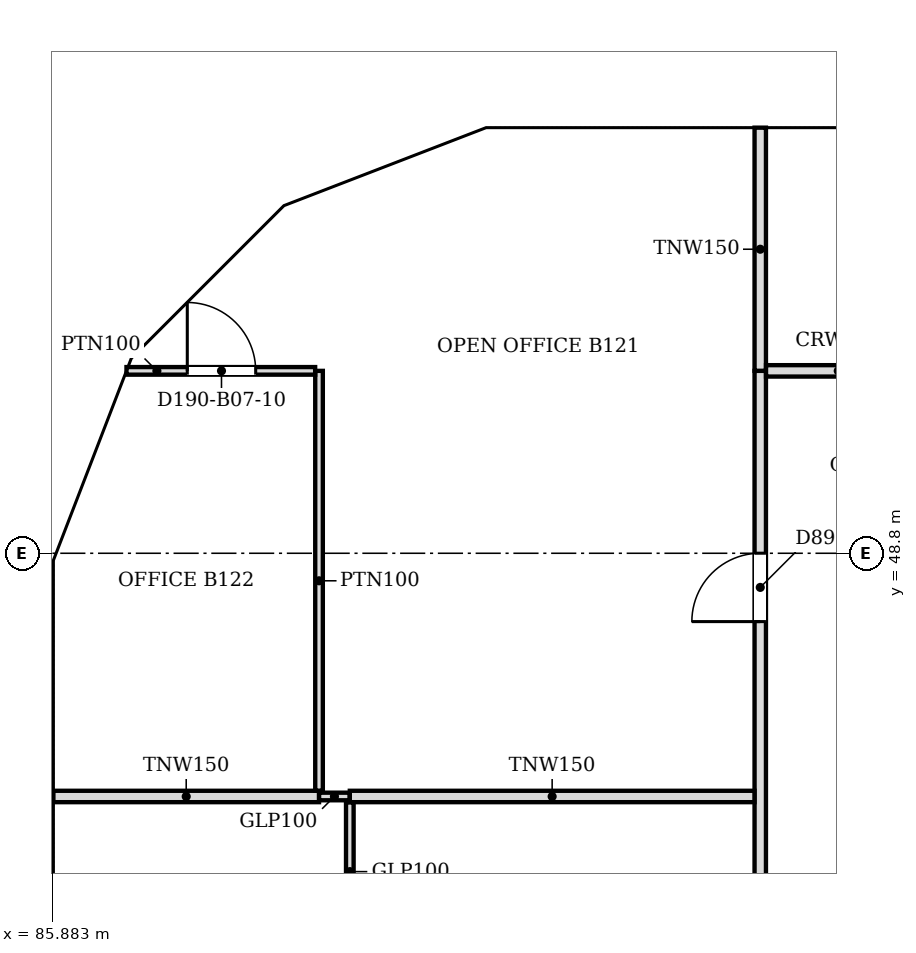
"""IFC4 building model, lengths in metres.
Left out: names, types, materials, properties, quantities, classifications, styles, units other than length and angle.
Written with IfcOpenShell. Run it as: python <this file> out.ifc"""

import sys

from ifc_helpers import new_model, si_unit, direction, frame, frame_2d, origin, place, context, subcontext, project, spatial, polyline, rectangle, outline, extrude, faceted_brep, source, transform, mapped, element, fill, save


model = new_model("IFC4")
c1 = context("Model", 3, precision=1e-05, world=origin(), true_north=direction((0.0, 1.0)))
c2 = subcontext(c1, "Body", "Model", "MODEL_VIEW")
j1 = project(units=[si_unit("LENGTHUNIT", "METRE"), si_unit("PLANEANGLEUNIT", "RADIAN")], contexts=[c1])
p1 = place(None, origin())
s1 = spatial("IfcSite", under=j1, at=p1, CompositionType="ELEMENT")
p2 = place(p1, origin())
s2 = spatial("IfcBuilding", under=s1, at=p2, CompositionType="ELEMENT")
p3 = place(p2, frame((0.0, 0.0, 72.4)))
s3 = spatial("IfcBuildingStorey", under=s2, at=p3, CompositionType="ELEMENT", Elevation=72.4)
m1 = source(origin(), c2, "Body", "Brep", [
    faceted_brep([(3.05, -0.25, 0.0), (6.053, -0.25, 3.8), (3.05, -0.25, 7.6), (0.0, -0.25, 3.8), (0.0, 0.25, 3.8), (3.05, 0.25, 7.6), (6.007, 0.25, 3.859), (6.007, 0.25, 3.741), (3.05, 0.25, 0.0), (6.053, 0.0, 3.8)], [[[0, 1, 2, 3]], [[4, 5, 6, 7, 8]], [[8, 7, 9, 1, 0]], [[6, 5, 2, 1, 9]], [[5, 4, 3, 2]], [[4, 8, 0, 3]], [[9, 7, 6]]]),
])
p4 = place(p3, frame((97.6, 54.65, -3.8), z_axis=(0.0, 0.0, 1.0), x_axis=(-1.0, 0.0, 0.0)))
e1 = element("IfcWall", 1, at=p4, inside=s3, PredefinedType="SOLIDWALL", context=c2, shape_type="MappedRepresentation", body=[
    mapped(m1, transform((0.0, 0.0, 0.0), scale=1.0)),
])
m2 = source(origin(), c2, "Body", "SweptSolid", [
    extrude(outline(polyline([(3.049, 0.401), (5.735, 3.8), (3.049, 7.199), (0.321, 3.8), (3.049, 0.401)])), frame((0.0, 0.26, 0.0), z_axis=(0.0, -1.0, 0.0), x_axis=(1.0, 0.0, 0.0)), (0.0, 0.0, 1.0), 0.52),
])
p5 = place(p4, origin())
e2 = element("IfcOpeningElement", 2, at=p5, cuts=e1, PredefinedType="OPENING", context=c2, shape_type="MappedRepresentation", body=[
    mapped(m2, transform((0.0, 0.0, 0.0), scale=1.0)),
])
m3 = source(origin(), c2, "Body", "Brep", [
    faceted_brep([(2.95, -0.25, 0.0), (3.003, -0.25, 0.068), (3.003, -0.25, 7.531), (2.95, -0.25, 7.6), (0.0, -0.25, 3.8), (0.047, 0.25, 3.86), (2.898, 0.25, 7.532), (2.898, 0.25, 0.068), (0.047, 0.25, 3.74), (2.95, 0.0, 0.0), (2.95, 0.0, 7.6), (0.0, 0.0, 3.8)], [[[0, 1, 2, 3, 4]], [[5, 6, 7, 8]], [[1, 0, 9]], [[10, 3, 2]], [[6, 5, 11, 4, 3, 10]], [[8, 7, 9, 0, 4, 11]], [[8, 11, 5]], [[1, 9, 7, 6, 10, 2]]]),
])
p6 = place(p3, frame((91.547, 54.65, -3.8), z_axis=(0.0, 0.0, 1.0), x_axis=(-0.933007896601, -0.359855894603, 0.0)))
e3 = element("IfcWall", 3, at=p6, inside=s3, PredefinedType="SOLIDWALL", context=c2, shape_type="MappedRepresentation", body=[
    mapped(m3, transform((0.0, 0.0, 0.0), scale=1.0)),
])
m4 = source(origin(), c2, "Body", "SweptSolid", [
    extrude(outline(polyline([(2.75, 6.935), (0.316, 3.8), (2.75, 0.665), (2.75, 6.935)])), frame((0.0, 0.26, 0.0), z_axis=(0.0, -1.0, 0.0), x_axis=(1.0, 0.0, 0.0)), (0.0, 0.0, 1.0), 0.52),
])
p7 = place(p6, origin())
e4 = element("IfcOpeningElement", 4, at=p7, cuts=e3, PredefinedType="OPENING", context=c2, shape_type="MappedRepresentation", body=[
    mapped(m4, transform((0.0, 0.0, 0.0), scale=1.0)),
])
m5 = source(origin(), c2, "Body", "Brep", [
    faceted_brep([(0.053, -0.25, 0.0), (2.997, -0.25, 3.8), (0.053, -0.25, 7.6), (0.0, -0.25, 7.532), (0.0, -0.25, 0.068), (0.106, 0.25, 7.531), (2.944, 0.25, 3.868), (2.944, 0.25, 3.732), (0.106, 0.25, 0.068), (2.997, 0.0, 3.8), (0.053, 0.0, 0.0), (0.053, 0.0, 7.6)], [[[0, 1, 2, 3, 4]], [[5, 6, 7, 8]], [[8, 7, 9, 1, 0, 10]], [[6, 5, 11, 2, 1, 9]], [[3, 2, 11]], [[10, 0, 4]], [[8, 10, 4, 3, 11, 5]], [[9, 7, 6]]]),
])
p8 = place(p3, frame((88.831, 53.625, -3.8), z_axis=(0.0, 0.0, 1.0), x_axis=(-0.707147509625, -0.707066050402, 0.0)))
e5 = element("IfcWall", 5, at=p8, inside=s3, PredefinedType="SOLIDWALL", context=c2, shape_type="MappedRepresentation", body=[
    mapped(m5, transform((0.0, 0.0, 0.0), scale=1.0)),
])
m6 = source(origin(), c2, "Body", "SweptSolid", [
    extrude(outline(polyline([(0.253, 0.666), (2.681, 3.8), (0.253, 6.934), (0.253, 0.666)])), frame((0.0, 0.26, 0.0), z_axis=(0.0, -1.0, 0.0), x_axis=(1.0, 0.0, 0.0)), (0.0, 0.0, 1.0), 0.52),
])
p9 = place(p8, origin())
e6 = element("IfcOpeningElement", 6, at=p9, cuts=e5, PredefinedType="OPENING", context=c2, shape_type="MappedRepresentation", body=[
    mapped(m6, transform((0.0, 0.0, 0.0), scale=1.0)),
])
m7 = source(origin(), c2, "Body", "Brep", [
    faceted_brep([(2.95, -0.25, 0.0), (2.997, -0.25, 0.059), (2.997, -0.25, 7.541), (2.95, -0.25, 7.6), (0.0, -0.25, 3.8), (0.053, 0.25, 3.868), (2.904, 0.25, 7.54), (2.904, 0.25, 0.06), (0.053, 0.25, 3.732), (2.95, 0.0, 0.0), (2.95, 0.0, 7.6), (0.0, 0.0, 3.8)], [[[0, 1, 2, 3, 4]], [[5, 6, 7, 8]], [[1, 0, 9]], [[10, 3, 2]], [[6, 5, 11, 4, 3, 10]], [[8, 7, 9, 0, 4, 11]], [[8, 11, 5]], [[1, 9, 7, 6, 10, 2]]]),
])
p10 = place(p3, frame((86.712, 51.506, -3.8), z_axis=(0.0, 0.0, 1.0), x_axis=(-0.359874094142, -0.933000876937, 0.0)))
e7 = element("IfcWall", 7, at=p10, inside=s3, PredefinedType="SOLIDWALL", context=c2, shape_type="MappedRepresentation", body=[
    mapped(m7, transform((0.0, 0.0, 0.0), scale=1.0)),
])
p11 = place(p10, origin())
e8 = element("IfcOpeningElement", 8, at=p11, cuts=e7, PredefinedType="OPENING", context=c2, shape_type="MappedRepresentation", body=[
    mapped(m4, transform((0.0, 0.0, 0.0), scale=1.0)),
])
m8 = source(origin(), c2, "Body", "Brep", [
    faceted_brep([(0.047, -0.25, 0.0), (3.05, -0.25, 3.8), (0.047, -0.25, 7.6), (0.0, -0.25, 7.54), (0.0, -0.25, 0.06), (0.093, 0.25, 7.541), (3.05, 0.25, 3.8), (0.093, 0.25, 0.059), (0.047, 0.0, 0.0), (0.047, 0.0, 7.6)], [[[0, 1, 2, 3, 4]], [[5, 6, 7]], [[7, 6, 1, 0, 8]], [[6, 5, 9, 2, 1]], [[3, 2, 9]], [[8, 0, 4]], [[7, 8, 4, 3, 9, 5]]]),
])
p12 = place(p3, frame((85.65, 48.8, -3.8), z_axis=(0.0, 0.0, 1.0), x_axis=(0.0, -1.0, 0.0)))
e9 = element("IfcWall", 9, at=p12, inside=s3, PredefinedType="SOLIDWALL", context=c2, shape_type="MappedRepresentation", body=[
    mapped(m8, transform((0.0, 0.0, 0.0), scale=1.0)),
])
m9 = source(origin(), c2, "Body", "SweptSolid", [
    extrude(outline(polyline([(0.247, 0.656), (2.731, 3.8), (0.247, 6.944), (0.247, 0.656)])), frame((0.0, 0.26, 0.0), z_axis=(0.0, -1.0, 0.0), x_axis=(1.0, 0.0, 0.0)), (0.0, 0.0, 1.0), 0.52),
])
p13 = place(p12, origin())
e10 = element("IfcOpeningElement", 10, at=p13, cuts=e9, PredefinedType="OPENING", context=c2, shape_type="MappedRepresentation", body=[
    mapped(m9, transform((0.0, 0.0, 0.0), scale=1.0)),
])
m10 = source(origin(), c2, "Body", "SweptSolid", [
    extrude(outline(polyline([(3.05, 0.0), (6.1, 3.8), (3.05, 7.6), (0.0, 3.8), (3.05, 0.0)])), frame((0.0, 0.25, 0.0), z_axis=(0.0, -1.0, 0.0), x_axis=(1.0, 0.0, 0.0)), (0.0, 0.0, 1.0), 0.5),
])
p14 = place(p3, frame((85.65, 45.75, -3.8), z_axis=(0.0, 0.0, 1.0), x_axis=(0.0, -1.0, 0.0)))
e11 = element("IfcWall", 11, at=p14, inside=s3, PredefinedType="SOLIDWALL", context=c2, shape_type="MappedRepresentation", body=[
    mapped(m10, transform((0.0, 0.0, 0.0), scale=1.0)),
])
m11 = source(origin(), c2, "Body", "SweptSolid", [
    extrude(outline(polyline([(3.05, 0.399), (5.78, 3.8), (3.05, 7.2), (0.321, 3.8), (3.05, 0.399)])), frame((0.0, 0.26, 0.0), z_axis=(0.0, -1.0, 0.0), x_axis=(1.0, 0.0, 0.0)), (0.0, 0.0, 1.0), 0.52),
])
p15 = place(p14, origin())
e12 = element("IfcOpeningElement", 12, at=p15, cuts=e11, PredefinedType="OPENING", context=c2, shape_type="MappedRepresentation", body=[
    mapped(m11, transform((0.0, 0.0, 0.0), scale=1.0)),
])
p16 = place(p2, frame((0.0, 0.0, 76.2)))
s4 = spatial("IfcBuildingStorey", under=s2, at=p16, CompositionType="ELEMENT", Elevation=76.2)
m12 = source(origin(), c2, "Body", "Brep", [
    faceted_brep([(3.05, -0.25, 0.0), (6.1, -0.25, 3.8), (6.1, -0.25, 3.8), (3.05, -0.25, 7.6), (0.0, -0.25, 3.8), (0.0, 0.25, 3.8), (3.05, 0.25, 7.6), (6.1, 0.25, 3.8), (6.1, 0.25, 3.8), (3.05, 0.25, 0.0)], [[[0, 1, 2, 3, 4]], [[5, 6, 7, 8, 9]], [[9, 8, 1, 0]], [[7, 6, 3, 2]], [[6, 5, 4, 3]], [[5, 9, 0, 4]], [[1, 8, 7, 2]]]),
])
p17 = place(p16, frame((100.65, 54.65, -3.8), z_axis=(0.0, 0.0, 1.0), x_axis=(-1.0, 0.0, 0.0)))
e13 = element("IfcWall", 13, at=p17, inside=s4, PredefinedType="SOLIDWALL", context=c2, shape_type="MappedRepresentation", body=[
    mapped(m12, transform((0.0, 0.0, 0.0), scale=1.0)),
])
m13 = source(origin(), c2, "Body", "SweptSolid", [
    extrude(outline(polyline([(3.05, 0.399), (5.78, 3.8), (3.05, 7.201), (0.321, 3.8), (3.05, 0.399)])), frame((0.0, 0.26, 0.0), z_axis=(0.0, -1.0, 0.0), x_axis=(1.0, 0.0, 0.0)), (0.0, 0.0, 1.0), 0.52),
])
p18 = place(p17, origin())
e14 = element("IfcOpeningElement", 14, at=p18, cuts=e13, PredefinedType="OPENING", context=c2, shape_type="MappedRepresentation", body=[
    mapped(m13, transform((0.0, 0.0, 0.0), scale=1.0)),
])
m14 = source(origin(), c2, "Body", "Brep", [
    faceted_brep([(3.003, -0.25, 0.0), (3.05, -0.25, 0.06), (3.05, -0.25, 7.54), (3.003, -0.25, 7.6), (0.0, -0.25, 3.8), (0.0, 0.25, 3.8), (2.957, 0.25, 7.541), (2.957, 0.25, 0.059), (3.003, 0.0, 0.0), (3.003, 0.0, 7.6)], [[[0, 1, 2, 3, 4]], [[5, 6, 7]], [[1, 0, 8]], [[9, 3, 2]], [[6, 5, 4, 3, 9]], [[5, 7, 8, 0, 4]], [[1, 8, 7, 6, 9, 2]]]),
])
p19 = place(p16, frame((94.55, 54.65, -3.8), z_axis=(0.0, 0.0, 1.0), x_axis=(-1.0, 0.0, 0.0)))
e15 = element("IfcWall", 15, at=p19, inside=s4, PredefinedType="SOLIDWALL", context=c2, shape_type="MappedRepresentation", body=[
    mapped(m14, transform((0.0, 0.0, 0.0), scale=1.0)),
])
m15 = source(origin(), c2, "Body", "SweptSolid", [
    extrude(outline(polyline([(2.803, 6.944), (0.319, 3.8), (2.803, 0.656), (2.803, 6.944)])), frame((0.0, 0.26, 0.0), z_axis=(0.0, -1.0, 0.0), x_axis=(1.0, 0.0, 0.0)), (0.0, 0.0, 1.0), 0.52),
])
p20 = place(p19, origin())
e16 = element("IfcOpeningElement", 16, at=p20, cuts=e15, PredefinedType="OPENING", context=c2, shape_type="MappedRepresentation", body=[
    mapped(m15, transform((0.0, 0.0, 0.0), scale=1.0)),
])
m16 = source(origin(), c2, "Body", "Brep", [
    faceted_brep([(0.047, -0.25, 0.0), (2.997, -0.25, 3.8), (0.047, -0.25, 7.6), (0.0, -0.25, 7.541), (0.0, -0.25, 0.059), (0.093, 0.25, 7.54), (2.944, 0.25, 3.868), (2.944, 0.25, 3.732), (0.093, 0.25, 0.06), (2.997, 0.0, 3.8), (0.047, 0.0, 0.0), (0.047, 0.0, 7.6)], [[[0, 1, 2, 3, 4]], [[5, 6, 7, 8]], [[8, 7, 9, 1, 0, 10]], [[6, 5, 11, 2, 1, 9]], [[3, 2, 11]], [[10, 0, 4]], [[8, 10, 4, 3, 11, 5]], [[9, 7, 6]]]),
])
p21 = place(p16, frame((91.59, 54.667, -3.8), z_axis=(0.0, 0.0, 1.0), x_axis=(-0.933000876937, -0.359874094142, 0.0)))
e17 = element("IfcWall", 17, at=p21, inside=s4, PredefinedType="SOLIDWALL", context=c2, shape_type="MappedRepresentation", body=[
    mapped(m16, transform((0.0, 0.0, 0.0), scale=1.0)),
])
m17 = source(origin(), c2, "Body", "SweptSolid", [
    extrude(outline(polyline([(0.247, 0.665), (2.681, 3.8), (0.247, 6.935), (0.247, 0.665)])), frame((0.0, 0.26, 0.0), z_axis=(0.0, -1.0, 0.0), x_axis=(1.0, 0.0, 0.0)), (0.0, 0.0, 1.0), 0.52),
])
p22 = place(p21, origin())
e18 = element("IfcOpeningElement", 18, at=p22, cuts=e17, PredefinedType="OPENING", context=c2, shape_type="MappedRepresentation", body=[
    mapped(m17, transform((0.0, 0.0, 0.0), scale=1.0)),
])
m18 = source(origin(), c2, "Body", "Brep", [
    faceted_brep([(2.944, -0.25, 0.0), (2.997, -0.25, 0.068), (2.997, -0.25, 7.532), (2.944, -0.25, 7.6), (0.0, -0.25, 3.8), (0.053, 0.25, 3.868), (2.891, 0.25, 7.532), (2.891, 0.25, 0.068), (0.053, 0.25, 3.732), (2.944, 0.0, 0.0), (2.944, 0.0, 7.6), (0.0, 0.0, 3.8)], [[[0, 1, 2, 3, 4]], [[5, 6, 7, 8]], [[1, 0, 9]], [[10, 3, 2]], [[6, 5, 11, 4, 3, 10]], [[8, 7, 9, 0, 4, 11]], [[8, 11, 5]], [[1, 9, 7, 6, 10, 2]]]),
])
p23 = place(p16, frame((88.794, 53.588, -3.8), z_axis=(0.0, 0.0, 1.0), x_axis=(-0.707066050402, -0.707147509625, 0.0)))
e19 = element("IfcWall", 19, at=p23, inside=s4, PredefinedType="SOLIDWALL", context=c2, shape_type="MappedRepresentation", body=[
    mapped(m18, transform((0.0, 0.0, 0.0), scale=1.0)),
])
m19 = source(origin(), c2, "Body", "SweptSolid", [
    extrude(outline(polyline([(2.744, 6.934), (0.316, 3.8), (2.744, 0.667), (2.744, 6.934)])), frame((0.0, 0.26, 0.0), z_axis=(0.0, -1.0, 0.0), x_axis=(1.0, 0.0, 0.0)), (0.0, 0.0, 1.0), 0.52),
])
p24 = place(p23, origin())
e20 = element("IfcOpeningElement", 20, at=p24, cuts=e19, PredefinedType="OPENING", context=c2, shape_type="MappedRepresentation", body=[
    mapped(m19, transform((0.0, 0.0, 0.0), scale=1.0)),
])
m20 = source(origin(), c2, "Body", "Brep", [
    faceted_brep([(0.053, -0.25, 0.0), (3.003, -0.25, 3.8), (0.053, -0.25, 7.6), (0.0, -0.25, 7.532), (0.0, -0.25, 0.068), (0.106, 0.25, 7.532), (2.957, 0.25, 3.86), (2.957, 0.25, 3.74), (0.106, 0.25, 0.068), (3.003, 0.0, 3.8), (0.053, 0.0, 0.0), (0.053, 0.0, 7.6)], [[[0, 1, 2, 3, 4]], [[5, 6, 7, 8]], [[8, 7, 9, 1, 0, 10]], [[6, 5, 11, 2, 1, 9]], [[3, 2, 11]], [[10, 0, 4]], [[8, 10, 4, 3, 11, 5]], [[9, 7, 6]]]),
])
p25 = place(p16, frame((86.731, 51.556, -3.8), z_axis=(0.0, 0.0, 1.0), x_axis=(-0.359855894603, -0.933007896601, 0.0)))
e21 = element("IfcWall", 21, at=p25, inside=s4, PredefinedType="SOLIDWALL", context=c2, shape_type="MappedRepresentation", body=[
    mapped(m20, transform((0.0, 0.0, 0.0), scale=1.0)),
])
m21 = source(origin(), c2, "Body", "SweptSolid", [
    extrude(outline(polyline([(0.253, 0.665), (2.687, 3.8), (0.253, 6.935), (0.253, 0.665)])), frame((0.0, 0.26, 0.0), z_axis=(0.0, -1.0, 0.0), x_axis=(1.0, 0.0, 0.0)), (0.0, 0.0, 1.0), 0.52),
])
p26 = place(p25, origin())
e22 = element("IfcOpeningElement", 22, at=p26, cuts=e21, PredefinedType="OPENING", context=c2, shape_type="MappedRepresentation", body=[
    mapped(m21, transform((0.0, 0.0, 0.0), scale=1.0)),
])
m22 = source(origin(), c2, "Body", "Brep", [
    faceted_brep([(3.003, -0.25, 0.0), (6.053, -0.25, 3.8), (3.003, -0.25, 7.6), (0.0, -0.25, 3.8), (0.047, 0.25, 3.859), (3.003, 0.25, 7.6), (6.053, 0.25, 3.8), (3.003, 0.25, 0.0), (0.047, 0.25, 3.741), (0.0, 0.0, 3.8)], [[[0, 1, 2, 3]], [[4, 5, 6, 7, 8]], [[7, 6, 1, 0]], [[6, 5, 2, 1]], [[5, 4, 9, 3, 2]], [[8, 7, 0, 3, 9]], [[8, 9, 4]]]),
])
p27 = place(p16, frame((85.65, 48.753, -3.8), z_axis=(0.0, 0.0, 1.0), x_axis=(0.0, -1.0, 0.0)))
e23 = element("IfcWall", 23, at=p27, inside=s4, PredefinedType="SOLIDWALL", context=c2, shape_type="MappedRepresentation", body=[
    mapped(m22, transform((0.0, 0.0, 0.0), scale=1.0)),
])
m23 = source(origin(), c2, "Body", "SweptSolid", [
    extrude(outline(polyline([(3.005, 0.401), (5.733, 3.8), (3.005, 7.199), (0.319, 3.8), (3.005, 0.401)])), frame((0.0, 0.26, 0.0), z_axis=(0.0, -1.0, 0.0), x_axis=(1.0, 0.0, 0.0)), (0.0, 0.0, 1.0), 0.52),
])
p28 = place(p27, origin())
e24 = element("IfcOpeningElement", 24, at=p28, cuts=e23, PredefinedType="OPENING", context=c2, shape_type="MappedRepresentation", body=[
    mapped(m23, transform((0.0, 0.0, 0.0), scale=1.0)),
])
p29 = place(p3, frame((95.2, 36.6, 0.0), z_axis=(0.0, 0.0, 1.0), x_axis=(0.0, 1.0, 0.0)))
e25 = element("IfcWall", 25, at=p29, inside=s3, PredefinedType="PARTITIONING", context=c2, shape_type="SweptSolid", body=[
    extrude(rectangle(XDim=14.6, YDim=0.15, at=frame_2d((7.3, 0.0))), origin(), (0.0, 0.0, 1.0), 3.067),
])
m24 = source(origin(), c2, "Body", "SweptSolid", [
    extrude(rectangle(XDim=0.9, YDim=2.1, at=frame_2d((0.45, 1.05))), frame((0.0, 0.085, 0.0), z_axis=(0.0, -1.0, 0.0), x_axis=(1.0, 0.0, 0.0)), (0.0, 0.0, 1.0), 0.17),
])
p30 = place(p29, frame((11.301, 0.0, 0.0)))
e26 = element("IfcOpeningElement", 26, at=p30, cuts=e25, PredefinedType="OPENING", context=c2, shape_type="MappedRepresentation", body=[
    mapped(m24, transform((0.0, 0.0, 0.0), scale=1.0)),
])
p31 = place(p3, frame((89.8, 40.999, 0.0), z_axis=(0.0, 0.0, 1.0), x_axis=(0.0, 1.0, 0.0)))
e27 = element("IfcWall", 27, at=p31, inside=s3, PredefinedType="PARTITIONING", context=c2, shape_type="SweptSolid", body=[
    extrude(rectangle(XDim=4.525, YDim=0.1, at=frame_2d((2.263, 0.0))), origin(), (0.0, 0.0, 1.0), 3.067),
])
m25 = source(origin(), c2, "Body", "SweptSolid", [
    extrude(rectangle(XDim=0.9, YDim=2.1, at=frame_2d((0.45, 1.05))), frame((0.0, 0.06, 0.0), z_axis=(0.0, -1.0, 0.0), x_axis=(1.0, 0.0, 0.0)), (0.0, 0.0, 1.0), 0.12),
])
p32 = place(p31, frame((1.8, 0.0, 0.0)))
e28 = element("IfcOpeningElement", 28, at=p32, cuts=e27, PredefinedType="OPENING", context=c2, shape_type="MappedRepresentation", body=[
    mapped(m25, transform((0.0, 0.0, 0.0), scale=1.0)),
])
p33 = place(p3, frame((85.9, 45.6, 0.0), z_axis=(0.0, 0.0, 1.0), x_axis=(1.0, 0.0, 0.0)))
e29 = element("IfcWall", 29, at=p33, inside=s3, PredefinedType="PARTITIONING", context=c2, shape_type="SweptSolid", body=[
    extrude(rectangle(XDim=3.495, YDim=0.15, at=frame_2d((1.748, 0.0))), origin(), (0.0, 0.0, 1.0), 3.067),
])
p34 = place(p3, frame((89.396, 45.6, 0.0), z_axis=(0.0, 0.0, 1.0), x_axis=(1.0, 0.0, 0.0)))
e30 = element("IfcWall", 30, at=p34, inside=s3, PredefinedType="PARTITIONING", context=c2, shape_type="SweptSolid", body=[
    extrude(rectangle(XDim=0.403, YDim=0.1, at=frame_2d((0.202, 0.0))), origin(), (0.0, 0.0, 1.0), 3.067),
])
p35 = place(p3, frame((89.8, 45.6, 0.0), z_axis=(0.0, 0.0, 1.0), x_axis=(1.0, 0.0, 0.0)))
e31 = element("IfcWall", 31, at=p35, inside=s3, PredefinedType="PARTITIONING", context=c2, shape_type="SweptSolid", body=[
    extrude(rectangle(XDim=5.324, YDim=0.15, at=frame_2d((2.662, 0.0))), origin(), (0.0, 0.0, 1.0), 3.067),
])
p36 = place(p3, frame((89.395, 45.676, 0.0), z_axis=(0.0, 0.0, 1.0), x_axis=(0.0, 1.0, 0.0)))
e32 = element("IfcWall", 32, at=p36, inside=s3, PredefinedType="PARTITIONING", context=c2, shape_type="SweptSolid", body=[
    extrude(rectangle(XDim=5.524, YDim=0.1, at=frame_2d((2.762, 0.0))), origin(), (0.0, 0.0, 1.0), 3.067),
])
p37 = place(p3, frame((89.344, 51.2, 0.0), z_axis=(0.0, 0.0, 1.0), x_axis=(-1.0, 0.0, 0.0)))
e33 = element("IfcWall", 33, at=p37, inside=s3, PredefinedType="PARTITIONING", context=c2, shape_type="SweptSolid", body=[
    extrude(rectangle(XDim=2.482, YDim=0.1, at=frame_2d((1.241, 0.0))), origin(), (0.0, 0.0, 1.0), 3.067),
])
p38 = place(p37, frame((0.782, 0.0, 0.0)))
e34 = element("IfcOpeningElement", 34, at=p38, cuts=e33, PredefinedType="OPENING", context=c2, shape_type="MappedRepresentation", body=[
    mapped(m25, transform((0.0, 0.0, 0.0), scale=1.0)),
])
p39 = place(p3, frame((95.2, 51.201, 0.0), z_axis=(0.0, 0.0, 1.0), x_axis=(0.0, 1.0, 0.0)))
e35 = element("IfcWall", 35, at=p39, inside=s3, PredefinedType="PARTITIONING", context=c2, shape_type="SweptSolid", body=[
    extrude(rectangle(XDim=3.199, YDim=0.15, at=frame_2d((1.6, 0.0))), origin(), (0.0, 0.0, 1.0), 3.067),
])
p40 = place(p3, frame((95.276, 51.2, 0.0), z_axis=(0.0, 0.0, 1.0), x_axis=(1.0, 0.0, 0.0)))
e36 = element("IfcWall", 36, at=p40, inside=s3, PredefinedType="PARTITIONING", context=c2, shape_type="SweptSolid", body=[
    extrude(rectangle(XDim=4.724, YDim=0.15, at=frame_2d((2.362, 0.0))), origin(), (0.0, 0.0, 1.0), 3.067),
])
m26 = source(origin(), c2, "Body", "SweptSolid", [
    extrude(rectangle(XDim=1.0, YDim=2.1, at=frame_2d((0.5, 1.05))), frame((0.0, 0.085, 0.0), z_axis=(0.0, -1.0, 0.0), x_axis=(1.0, 0.0, 0.0)), (0.0, 0.0, 1.0), 0.17),
])
p41 = place(p40, frame((1.9, 0.0, 0.0)))
e37 = element("IfcOpeningElement", 37, at=p41, cuts=e36, PredefinedType="OPENING", context=c2, shape_type="MappedRepresentation", body=[
    mapped(m26, transform((0.0, 0.0, 0.0), scale=1.0)),
])
m27 = source(origin(), c2, "Body", "SweptSolid", [
    extrude(rectangle(XDim=0.9, YDim=2.1, at=frame_2d((0.45, 1.05))), frame((0.0, 0.025, 0.0), z_axis=(0.0, -1.0, 0.0), x_axis=(1.0, 0.0, 0.0)), (0.0, 0.0, 1.0), 0.05),
])
p42 = place(p30, origin())
e38 = element("IfcDoor", 38, at=p42, inside=s3, OperationType="SINGLE_SWING_LEFT", PredefinedType="DOOR", context=c2, shape_type="MappedRepresentation", body=[
    mapped(m27, transform((0.0, 0.0, 0.0), scale=1.0)),
])
fill(e26, e38)
p43 = place(p38, origin())
e39 = element("IfcDoor", 39, at=p43, inside=s3, OperationType="SINGLE_SWING_RIGHT", PredefinedType="DOOR", context=c2, shape_type="MappedRepresentation", body=[
    mapped(m27, transform((0.0, 0.0, 0.0), scale=1.0)),
])
fill(e34, e39)
save(model, sys.argv[1])
